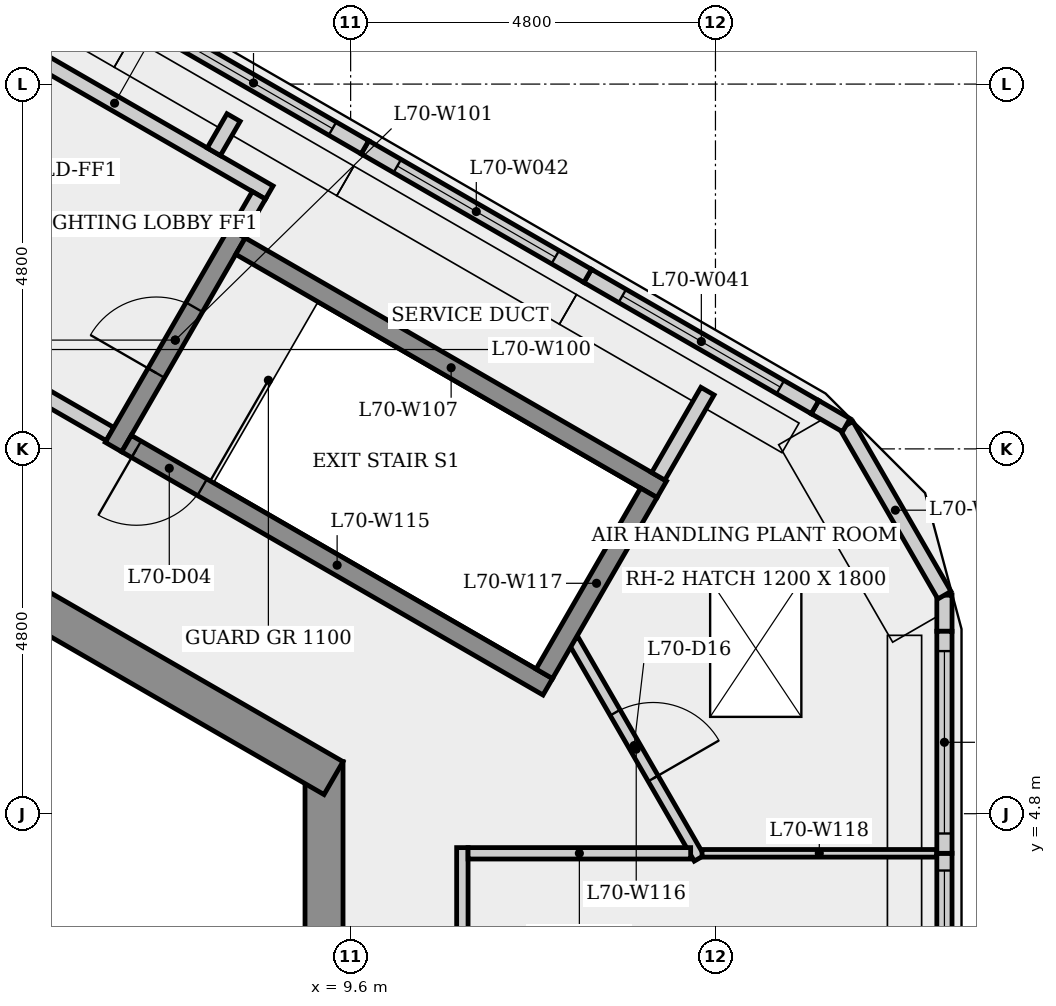
"""IFC4 building model, lengths in metres.
Left out: names, types, materials, properties, quantities, classifications, styles, units other than length and angle.
Written with IfcOpenShell. Run it as: python <this file> out.ifc"""

import sys

from ifc_helpers import new_model, si_unit, direction, frame, frame_2d, origin, origin_2d, place, context, subcontext, project, spatial, rectangle, extrude, element, fill, save


model = new_model("IFC4")
c1 = context("Model", 3, precision=1e-05, world=origin(), true_north=direction((0.0, 1.0)))
c2 = subcontext(c1, "Body", "Model", "MODEL_VIEW")
j1 = project(units=[si_unit("LENGTHUNIT", "METRE"), si_unit("PLANEANGLEUNIT", "RADIAN")], contexts=[c1])
p1 = place(None, origin())
s1 = spatial("IfcSite", under=j1, at=p1, CompositionType="ELEMENT")
p2 = place(p1, origin())
s2 = spatial("IfcBuilding", under=s1, at=p2, CompositionType="ELEMENT")
p3 = place(p2, frame((0.0, 0.0, 262.9)))
s3 = spatial("IfcBuildingStorey", under=s2, at=p3, CompositionType="ELEMENT", Elevation=262.9)
p4 = place(p3, frame((9.25, -5.485, 0.0), z_axis=(0.0, 0.0, 1.0), x_axis=(0.0, 1.0, 0.0)))
e1 = element("IfcWall", 1, at=p4, inside=s3, PredefinedType="SHEAR", context=c2, shape_type="SweptSolid", body=[
    extrude(rectangle(XDim=10.97, YDim=0.5, at=frame_2d((5.485, 0.0))), origin(), (0.0, 0.0, 1.0), 4.8),
])
p5 = place(p4, frame((4.685, 0.0, 0.0)))
e2 = element("IfcOpeningElement", 2, at=p5, cuts=e1, PredefinedType="OPENING", context=c2, shape_type="SweptSolid", body=[
    extrude(rectangle(XDim=1.6, YDim=2.1, at=frame_2d((0.8, 1.05))), frame((0.0, 0.26, 0.0), z_axis=(0.0, -1.0, 0.0), x_axis=(1.0, 0.0, 0.0)), (0.0, 0.0, 1.0), 0.52),
])
p6 = place(p3, frame((9.375, 5.268, 0.0), z_axis=(0.0, 0.0, 1.0), x_axis=(-0.866023993627, 0.500002442456, 0.0)))
e3 = element("IfcWall", 3, at=p6, inside=s3, PredefinedType="SHEAR", context=c2, shape_type="SweptSolid", body=[
    extrude(rectangle(XDim=10.97, YDim=0.5, at=frame_2d((5.485, 0.0))), origin(), (0.0, 0.0, 1.0), 4.8),
])
p7 = place(p6, frame((4.55, 0.0, 0.0)))
e4 = element("IfcOpeningElement", 4, at=p7, cuts=e3, PredefinedType="OPENING", context=c2, shape_type="SweptSolid", body=[
    extrude(rectangle(XDim=0.9, YDim=2.1, at=frame_2d((0.45, 1.05))), frame((0.0, 0.26, 0.0), z_axis=(0.0, -1.0, 0.0), x_axis=(1.0, 0.0, 0.0)), (0.0, 0.0, 1.0), 0.52),
])
p8 = place(p3, frame((17.413, 1.426, 0.0), z_axis=(0.0, 0.0, 1.0), x_axis=(0.0, 1.0, 0.0)))
e5 = element("IfcWall", 5, at=p8, inside=s3, PredefinedType="SOLIDWALL", context=c2, shape_type="SweptSolid", body=[
    extrude(rectangle(XDim=2.853, YDim=0.2, at=frame_2d((1.427, 0.0))), origin(), (0.0, 0.0, 1.0), 4.8),
])
p9 = place(p8, frame((0.227, 0.0, 0.8)))
e6 = element("IfcOpeningElement", 6, at=p9, cuts=e5, PredefinedType="OPENING", context=c2, shape_type="SweptSolid", body=[
    extrude(rectangle(XDim=2.4, YDim=2.4, at=frame_2d((1.2, 1.2))), frame((0.0, 0.11, 0.0), z_axis=(0.0, -1.0, 0.0), x_axis=(1.0, 0.0, 0.0)), (0.0, 0.0, 1.0), 0.22),
])
p10 = place(p3, frame((17.413, 4.279, 0.0), z_axis=(0.0, 0.0, 1.0), x_axis=(0.0, 1.0, 0.0)))
e7 = element("IfcWall", 7, at=p10, inside=s3, PredefinedType="SOLIDWALL", context=c2, shape_type="SweptSolid", body=[
    extrude(rectangle(XDim=2.921, YDim=0.2, at=frame_2d((1.461, 0.0))), origin(), (0.0, 0.0, 1.0), 4.8),
])
p11 = place(p10, frame((0.261, 0.0, 0.8)))
e8 = element("IfcOpeningElement", 8, at=p11, cuts=e7, PredefinedType="OPENING", context=c2, shape_type="SweptSolid", body=[
    extrude(rectangle(XDim=2.4, YDim=2.4, at=frame_2d((1.2, 1.2))), frame((0.0, 0.11, 0.0), z_axis=(0.0, -1.0, 0.0), x_axis=(1.0, 0.0, 0.0)), (0.0, 0.0, 1.0), 0.22),
])
p12 = place(p3, frame((17.413, 7.2, 0.0), z_axis=(0.0, 0.0, 1.0), x_axis=(0.0, 1.0, 0.0)))
e9 = element("IfcWall", 9, at=p12, inside=s3, PredefinedType="SOLIDWALL", context=c2, shape_type="SweptSolid", body=[
    extrude(rectangle(XDim=0.475, YDim=0.2, at=frame_2d((0.238, 0.0))), origin(), (0.0, 0.0, 1.0), 4.8),
])
p13 = place(p3, frame((17.413, 7.675, 0.0), z_axis=(0.0, 0.0, 1.0), x_axis=(-0.500063394028, 0.865988800131, 0.0)))
e10 = element("IfcWall", 10, at=p13, inside=s3, PredefinedType="SOLIDWALL", context=c2, shape_type="SweptSolid", body=[
    extrude(rectangle(XDim=2.583, YDim=0.2, at=frame_2d((1.292, 0.0))), origin(), (0.0, 0.0, 1.0), 4.8),
])
p14 = place(p3, frame((16.121, 9.912, 0.0), z_axis=(0.0, 0.0, 1.0), x_axis=(-0.865860123781, 0.500286164156, 0.0)))
e11 = element("IfcWall", 11, at=p14, inside=s3, PredefinedType="SOLIDWALL", context=c2, shape_type="SweptSolid", body=[
    extrude(rectangle(XDim=0.475, YDim=0.2, at=frame_2d((0.237, 0.0))), origin(), (0.0, 0.0, 1.0), 4.8),
])
p15 = place(p3, frame((15.71, 10.149, 0.0), z_axis=(0.0, 0.0, 1.0), x_axis=(-0.866064358114, 0.499932523051, 0.0)))
e12 = element("IfcWall", 12, at=p15, inside=s3, PredefinedType="SOLIDWALL", context=c2, shape_type="SweptSolid", body=[
    extrude(rectangle(XDim=3.454, YDim=0.2, at=frame_2d((1.727, 0.0))), origin(), (0.0, 0.0, 1.0), 4.8),
])
p16 = place(p15, frame((0.527, 0.0, 0.8)))
e13 = element("IfcOpeningElement", 13, at=p16, cuts=e12, PredefinedType="OPENING", context=c2, shape_type="SweptSolid", body=[
    extrude(rectangle(XDim=2.4, YDim=2.4, at=frame_2d((1.2, 1.2))), frame((0.0, 0.11, 0.0), z_axis=(0.0, -1.0, 0.0), x_axis=(1.0, 0.0, 0.0)), (0.0, 0.0, 1.0), 0.22),
])
p17 = place(p3, frame((12.719, 11.876, 0.0), z_axis=(0.0, 0.0, 1.0), x_axis=(-0.865992138996, 0.500057611879, 0.0)))
e14 = element("IfcWall", 14, at=p17, inside=s3, PredefinedType="SOLIDWALL", context=c2, shape_type="SweptSolid", body=[
    extrude(rectangle(XDim=3.384, YDim=0.2, at=frame_2d((1.692, 0.0))), origin(), (0.0, 0.0, 1.0), 4.8),
])
p18 = place(p17, frame((0.492, 0.0, 0.8)))
e15 = element("IfcOpeningElement", 15, at=p18, cuts=e14, PredefinedType="OPENING", context=c2, shape_type="SweptSolid", body=[
    extrude(rectangle(XDim=2.4, YDim=2.4, at=frame_2d((1.2, 1.2))), frame((0.0, 0.11, 0.0), z_axis=(0.0, -1.0, 0.0), x_axis=(1.0, 0.0, 0.0)), (0.0, 0.0, 1.0), 0.22),
])
p19 = place(p3, frame((9.788, 13.568, 0.0), z_axis=(0.0, 0.0, 1.0), x_axis=(-0.866051074803, 0.499955533855, 0.0)))
e16 = element("IfcWall", 16, at=p19, inside=s3, PredefinedType="SOLIDWALL", context=c2, shape_type="SweptSolid", body=[
    extrude(rectangle(XDim=3.385, YDim=0.2, at=frame_2d((1.692, 0.0))), origin(), (0.0, 0.0, 1.0), 4.8),
])
p20 = place(p19, frame((0.492, 0.0, 0.8)))
e17 = element("IfcOpeningElement", 17, at=p20, cuts=e16, PredefinedType="OPENING", context=c2, shape_type="SweptSolid", body=[
    extrude(rectangle(XDim=2.4, YDim=2.4, at=frame_2d((1.2, 1.2))), frame((0.0, 0.11, 0.0), z_axis=(0.0, -1.0, 0.0), x_axis=(1.0, 0.0, 0.0)), (0.0, 0.0, 1.0), 0.22),
])
p21 = place(p3, frame((4.459, 15.323, 0.0), z_axis=(0.0, 0.0, 1.0), x_axis=(0.866016039709, -0.500016218704, 0.0)))
e18 = element("IfcWall", 18, at=p21, inside=s3, PredefinedType="PLUMBINGWALL", context=c2, shape_type="SweptSolid", body=[
    extrude(rectangle(XDim=4.7, YDim=0.2, at=frame_2d((2.35, 0.0))), origin(), (0.0, 0.0, 1.0), 4.5),
])
p22 = place(p3, frame((6.435, 9.795, 0.0), z_axis=(0.0, 0.0, 1.0), x_axis=(-0.866012907634, 0.500021643343, 0.0)))
e19 = element("IfcWall", 19, at=p22, inside=s3, PredefinedType="PARTITIONING", context=c2, shape_type="SweptSolid", body=[
    extrude(rectangle(XDim=4.45, YDim=0.2, at=frame_2d((2.225, 0.0))), origin(), (0.0, 0.0, 1.0), 4.5),
])
p23 = place(p22, frame((1.675, 0.0, 0.0)))
e20 = element("IfcOpeningElement", 20, at=p23, cuts=e19, PredefinedType="OPENING", context=c2, shape_type="SweptSolid", body=[
    extrude(rectangle(XDim=1.1, YDim=2.1, at=frame_2d((0.55, 1.05))), frame((0.0, 0.11, 0.0), z_axis=(0.0, -1.0, 0.0), x_axis=(1.0, 0.0, 0.0)), (0.0, 0.0, 1.0), 0.22),
])
p24 = place(p3, frame((6.48, 9.624, 0.0), z_axis=(0.0, 0.0, 1.0), x_axis=(0.500017246033, 0.866015446554, 0.0)))
e21 = element("IfcWall", 21, at=p24, inside=s3, PredefinedType="SHEAR", context=c2, shape_type="SweptSolid", body=[
    extrude(rectangle(XDim=3.25, YDim=0.25, at=frame_2d((1.625, 0.0))), origin(), (0.0, 0.0, 1.0), 4.5),
])
p25 = place(p24, frame((1.125, 0.0, 0.0)))
e22 = element("IfcOpeningElement", 22, at=p25, cuts=e21, PredefinedType="OPENING", context=c2, shape_type="SweptSolid", body=[
    extrude(rectangle(XDim=1.0, YDim=2.1, at=frame_2d((0.5, 1.05))), frame((0.0, 0.135, 0.0), z_axis=(0.0, -1.0, 0.0), x_axis=(1.0, 0.0, 0.0)), (0.0, 0.0, 1.0), 0.27),
])
p26 = place(p3, frame((7.8, 13.51, 0.0), z_axis=(0.0, 0.0, 1.0), x_axis=(0.499980071345, 0.866036909293, 0.0)))
e23 = element("IfcWall", 23, at=p26, inside=s3, PredefinedType="PLUMBINGWALL", context=c2, shape_type="SweptSolid", body=[
    extrude(rectangle(XDim=0.52, YDim=0.2, at=frame_2d((0.26, 0.0))), origin(), (0.0, 0.0, 1.0), 4.5),
])
p27 = place(p3, frame((8.151, 12.268, 0.0), z_axis=(0.0, 0.0, 1.0), x_axis=(0.866025499775, -0.499999833739, 0.0)))
e24 = element("IfcWall", 24, at=p27, inside=s3, PredefinedType="SHEAR", context=c2, shape_type="SweptSolid", body=[
    extrude(rectangle(XDim=6.4, YDim=0.25, at=frame_2d((3.2, 0.0))), origin(), (0.0, 0.0, 1.0), 4.5),
])
p28 = place(p3, frame((8.393, 12.937, 0.0), z_axis=(0.0, 0.0, 1.0), x_axis=(-0.500065409566, -0.86598763626, 0.0)))
e25 = element("IfcWall", 25, at=p28, inside=s3, PredefinedType="PLUMBINGWALL", context=c2, shape_type="SweptSolid", body=[
    extrude(rectangle(XDim=0.575, YDim=0.2, at=frame_2d((0.288, 0.0))), origin(), (0.0, 0.0, 1.0), 4.5),
])
p29 = place(p3, frame((11.07, 4.354, 0.0), z_axis=(0.0, 0.0, 1.0), x_axis=(0.0, -1.0, 0.0)))
e26 = element("IfcWall", 26, at=p29, inside=s3, PredefinedType="PARTITIONING", context=c2, shape_type="SweptSolid", body=[
    extrude(rectangle(XDim=8.557, YDim=0.15, at=frame_2d((4.279, 0.0))), origin(), (0.0, 0.0, 1.0), 4.5),
])
p30 = place(p29, frame((2.426, 0.0, 0.0)))
e27 = element("IfcOpeningElement", 27, at=p30, cuts=e26, PredefinedType="OPENING", context=c2, shape_type="SweptSolid", body=[
    extrude(rectangle(XDim=1.0, YDim=2.1, at=frame_2d((0.5, 1.05))), frame((0.0, 0.085, 0.0), z_axis=(0.0, -1.0, 0.0), x_axis=(1.0, 0.0, 0.0)), (0.0, 0.0, 1.0), 0.17),
])
p31 = place(p3, frame((12.194, 6.47, 0.0), z_axis=(0.0, 0.0, 1.0), x_axis=(-0.866025499775, 0.499999833739, 0.0)))
e28 = element("IfcWall", 28, at=p31, inside=s3, PredefinedType="SHEAR", context=c2, shape_type="SweptSolid", body=[
    extrude(rectangle(XDim=6.4, YDim=0.25, at=frame_2d((3.2, 0.0))), origin(), (0.0, 0.0, 1.0), 4.5),
])
p32 = place(p31, frame((5.25, 0.0, 0.0)))
e29 = element("IfcOpeningElement", 29, at=p32, cuts=e28, PredefinedType="OPENING", context=c2, shape_type="SweptSolid", body=[
    extrude(rectangle(XDim=1.0, YDim=2.1, at=frame_2d((0.5, 1.05))), frame((0.0, 0.135, 0.0), z_axis=(0.0, -1.0, 0.0), x_axis=(1.0, 0.0, 0.0)), (0.0, 0.0, 1.0), 0.27),
])
p33 = place(p3, frame((12.529, 7.084, 0.0), z_axis=(0.0, 0.0, 1.0), x_axis=(0.500028477648, -0.866008961582, 0.0)))
e30 = element("IfcWall", 30, at=p33, inside=s3, PredefinedType="PARTITIONING", context=c2, shape_type="SweptSolid", body=[
    extrude(rectangle(XDim=3.315, YDim=0.15, at=frame_2d((1.657, 0.0))), origin(), (0.0, 0.0, 1.0), 4.5),
])
p34 = place(p33, frame((1.103, 0.0, 0.0)))
e31 = element("IfcOpeningElement", 31, at=p34, cuts=e30, PredefinedType="OPENING", context=c2, shape_type="SweptSolid", body=[
    extrude(rectangle(XDim=1.0, YDim=2.1, at=frame_2d((0.5, 1.05))), frame((0.0, 0.085, 0.0), z_axis=(0.0, -1.0, 0.0), x_axis=(1.0, 0.0, 0.0)), (0.0, 0.0, 1.0), 0.17),
])
p35 = place(p3, frame((12.148, 6.641, 0.0), z_axis=(0.0, 0.0, 1.0), x_axis=(0.500034990121, 0.866005201286, 0.0)))
e32 = element("IfcWall", 32, at=p35, inside=s3, PredefinedType="SHEAR", context=c2, shape_type="SweptSolid", body=[
    extrude(rectangle(XDim=2.75, YDim=0.25, at=frame_2d((1.375, 0.0))), origin(), (0.0, 0.0, 1.0), 4.5),
])
p36 = place(p3, frame((14.224, 4.279, 0.0), z_axis=(0.0, 0.0, 1.0), x_axis=(1.0, 0.0, 0.0)))
e33 = element("IfcWall", 33, at=p36, inside=s3, PredefinedType="PARTITIONING", context=c2, shape_type="SweptSolid", body=[
    extrude(rectangle(XDim=3.085, YDim=0.1, at=frame_2d((1.542, 0.0))), origin(), (0.0, 0.0, 1.0), 4.5),
])
p37 = place(p3, frame((14.074, 4.279, 0.0), z_axis=(0.0, 0.0, 1.0), x_axis=(-1.0, 0.0, 0.0)))
e34 = element("IfcWall", 34, at=p37, inside=s3, PredefinedType="PARTITIONING", context=c2, shape_type="SweptSolid", body=[
    extrude(rectangle(XDim=2.929, YDim=0.15, at=frame_2d((1.464, 0.0))), origin(), (0.0, 0.0, 1.0), 4.5),
])
p38 = place(p3, frame((14.295, 10.36, 0.0), z_axis=(0.0, 0.0, 1.0), x_axis=(-0.499972779981, -0.866041118699, 0.0)))
e35 = element("IfcWall", 35, at=p38, inside=s3, PredefinedType="PLUMBINGWALL", context=c2, shape_type="SweptSolid", body=[
    extrude(rectangle(XDim=1.294, YDim=0.2, at=frame_2d((0.647, 0.0))), origin(), (0.0, 0.0, 1.0), 4.5),
])
p39 = place(p9, origin())
e36 = element("IfcWindow", 36, at=p39, inside=s3, PartitioningType="SINGLE_PANEL", PredefinedType="WINDOW", context=c2, shape_type="SweptSolid", body=[
    extrude(rectangle(XDim=2.4, YDim=2.4, at=frame_2d((1.2, 1.2))), frame((0.0, 0.03, 0.0), z_axis=(0.0, -1.0, 0.0), x_axis=(1.0, 0.0, 0.0)), (0.0, 0.0, 1.0), 0.06),
])
fill(e6, e36)
p40 = place(p11, origin())
e37 = element("IfcWindow", 37, at=p40, inside=s3, PartitioningType="SINGLE_PANEL", PredefinedType="WINDOW", context=c2, shape_type="SweptSolid", body=[
    extrude(rectangle(XDim=2.4, YDim=2.4, at=frame_2d((1.2, 1.2))), frame((0.0, 0.03, 0.0), z_axis=(0.0, -1.0, 0.0), x_axis=(1.0, 0.0, 0.0)), (0.0, 0.0, 1.0), 0.06),
])
fill(e8, e37)
p41 = place(p16, origin())
e38 = element("IfcWindow", 38, at=p41, inside=s3, PartitioningType="SINGLE_PANEL", PredefinedType="WINDOW", context=c2, shape_type="SweptSolid", body=[
    extrude(rectangle(XDim=2.4, YDim=2.4, at=frame_2d((1.2, 1.2))), frame((0.0, 0.03, 0.0), z_axis=(0.0, -1.0, 0.0), x_axis=(1.0, 0.0, 0.0)), (0.0, 0.0, 1.0), 0.06),
])
fill(e13, e38)
p42 = place(p18, origin())
e39 = element("IfcWindow", 39, at=p42, inside=s3, PartitioningType="SINGLE_PANEL", PredefinedType="WINDOW", context=c2, shape_type="SweptSolid", body=[
    extrude(rectangle(XDim=2.4, YDim=2.4, at=frame_2d((1.2, 1.2))), frame((0.0, 0.03, 0.0), z_axis=(0.0, -1.0, 0.0), x_axis=(1.0, 0.0, 0.0)), (0.0, 0.0, 1.0), 0.06),
])
fill(e15, e39)
p43 = place(p20, origin())
e40 = element("IfcWindow", 40, at=p43, inside=s3, PartitioningType="SINGLE_PANEL", PredefinedType="WINDOW", context=c2, shape_type="SweptSolid", body=[
    extrude(rectangle(XDim=2.4, YDim=2.4, at=frame_2d((1.2, 1.2))), frame((0.0, 0.03, 0.0), z_axis=(0.0, -1.0, 0.0), x_axis=(1.0, 0.0, 0.0)), (0.0, 0.0, 1.0), 0.06),
])
fill(e17, e40)
p44 = place(p2, frame((0.0, 0.0, 267.7)))
p45 = place(p44, origin())
p46 = place(p45, frame((14.93, 6.974, -0.01)))
p47 = place(p46, frame((0.0, 0.0, 0.26)))
e41 = element("IfcWindow", 41, at=p47, inside=s3, PartitioningType="SINGLE_PANEL", PredefinedType="SKYLIGHT", context=c2, shape_type="SweptSolid", body=[
    extrude(rectangle(XDim=1.8, YDim=1.2, at=origin_2d()), origin(), (0.0, 0.0, 1.0), 0.05),
])
p48 = place(p32, origin())
e42 = element("IfcDoor", 42, at=p48, inside=s3, OperationType="SINGLE_SWING_RIGHT", PredefinedType="DOOR", context=c2, shape_type="SweptSolid", body=[
    extrude(rectangle(XDim=1.0, YDim=2.1, at=frame_2d((0.5, 1.05))), frame((0.0, 0.025, 0.0), z_axis=(0.0, -1.0, 0.0), x_axis=(1.0, 0.0, 0.0)), (0.0, 0.0, 1.0), 0.05),
])
fill(e29, e42)
p49 = place(p25, origin())
e43 = element("IfcDoor", 43, at=p49, inside=s3, OperationType="SINGLE_SWING_LEFT", PredefinedType="DOOR", context=c2, shape_type="SweptSolid", body=[
    extrude(rectangle(XDim=1.0, YDim=2.1, at=frame_2d((0.5, 1.05))), frame((0.0, 0.025, 0.0), z_axis=(0.0, -1.0, 0.0), x_axis=(1.0, 0.0, 0.0)), (0.0, 0.0, 1.0), 0.05),
])
fill(e22, e43)
p50 = place(p34, origin())
e44 = element("IfcDoor", 44, at=p50, inside=s3, OperationType="SINGLE_SWING_RIGHT", PredefinedType="DOOR", context=c2, shape_type="SweptSolid", body=[
    extrude(rectangle(XDim=1.0, YDim=2.1, at=frame_2d((0.5, 1.05))), frame((0.0, 0.025, 0.0), z_axis=(0.0, -1.0, 0.0), x_axis=(1.0, 0.0, 0.0)), (0.0, 0.0, 1.0), 0.05),
])
fill(e31, e44)
save(model, sys.argv[1])
